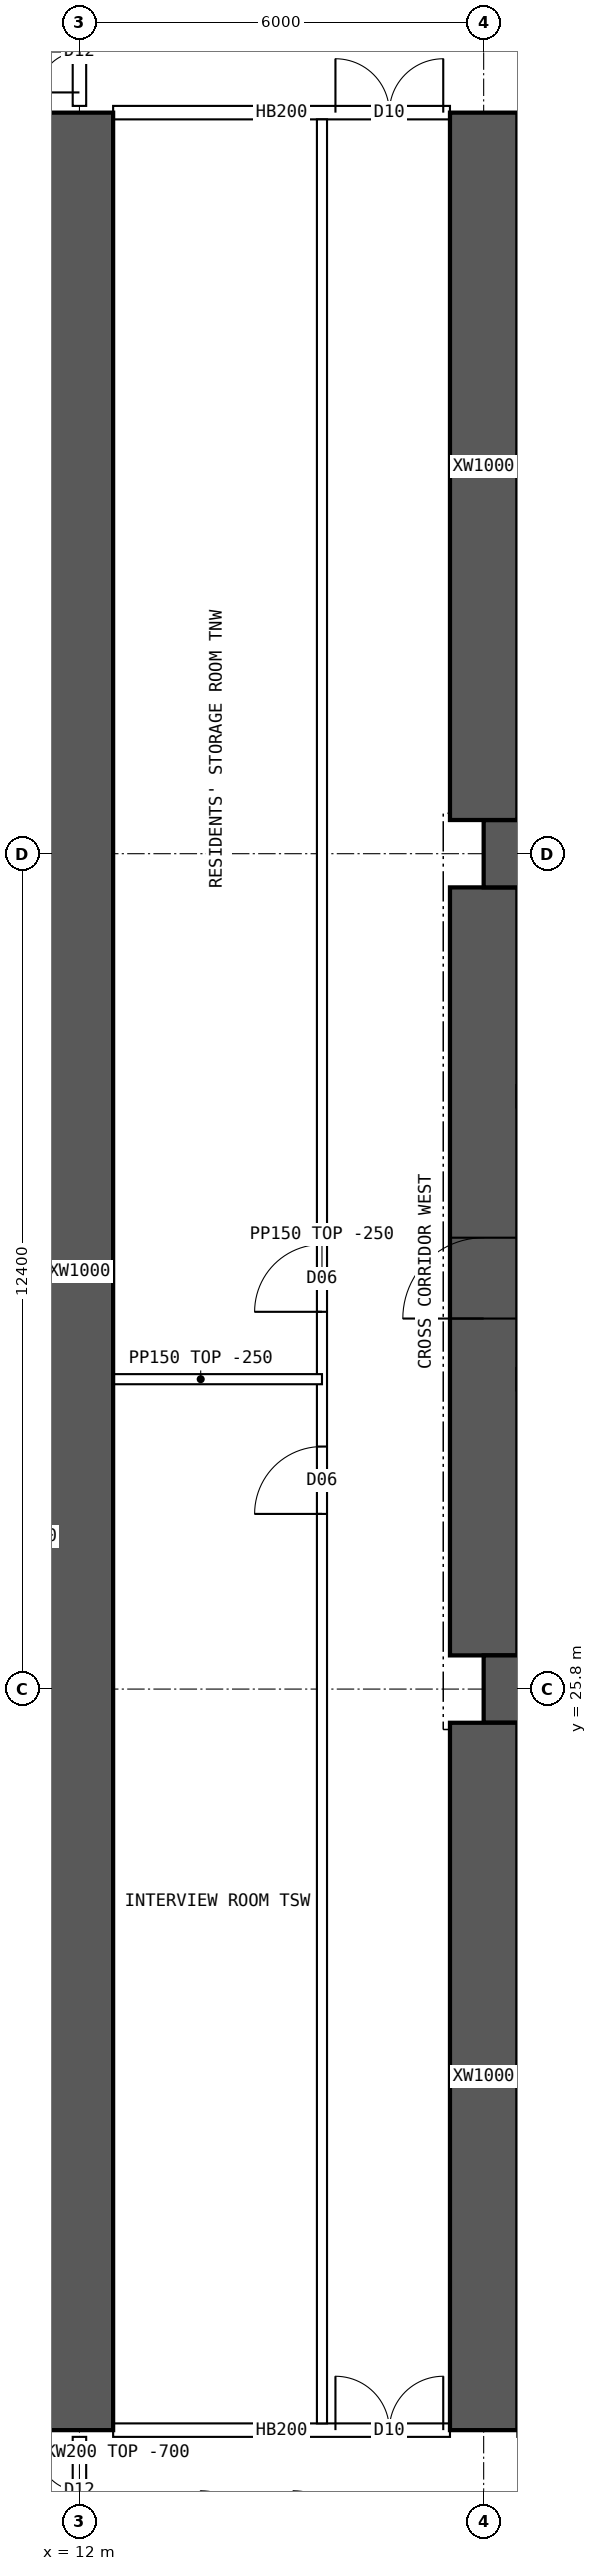
"""IFC4 building model, lengths in metres.
Left out: names, types, materials, properties, quantities, classifications, styles, units other than length and angle.
Written with IfcOpenShell. Run it as: python <this file> out.ifc"""

import sys

from ifc_helpers import new_model, si_unit, direction, frame, frame_2d, origin, place, context, subcontext, project, spatial, polyline, rectangle, outline, extrude, element, fill, save


model = new_model("IFC4")
c1 = context("Model", 3, precision=1e-05, world=origin(), true_north=direction((0.0, 1.0)))
c2 = subcontext(c1, "Body", "Model", "MODEL_VIEW")
j1 = project(units=[si_unit("LENGTHUNIT", "METRE"), si_unit("PLANEANGLEUNIT", "RADIAN")], contexts=[c1])
p1 = place(None, origin())
s1 = spatial("IfcSite", under=j1, at=p1, CompositionType="ELEMENT")
p2 = place(p1, origin())
s2 = spatial("IfcBuilding", under=s1, at=p2, CompositionType="ELEMENT")
p3 = place(p2, frame((0.0, 0.0, 61.45)))
s3 = spatial("IfcBuildingStorey", under=s2, at=p3, CompositionType="ELEMENT", Elevation=61.45)
for number, where, z_axis, x_axis in (
    (1, (18.0, 25.8, 0.0), (0.0, 0.0, 1.0), (1.0, 0.0, 0.0)),
    (2, (18.0, 38.2, 0.0), (0.0, 0.0, 1.0), (1.0, 0.0, 0.0)),
):
    element("IfcWall", number, at=place(p3, frame(where, z_axis=z_axis, x_axis=x_axis)), inside=s3, PredefinedType="SHEAR", context=c2, shape_type="SweptSolid", body=[
        extrude(rectangle(XDim=48.0, YDim=1.0, at=frame_2d((24.0, 0.0))), origin(), (0.0, 0.0, 1.0), 3.75),
    ])
p4 = place(p3, frame((18.0, 26.3, 0.0), z_axis=(0.0, 0.0, 1.0), x_axis=(0.0, 1.0, 0.0)))
e3 = element("IfcWall", 3, at=p4, inside=s3, PredefinedType="SHEAR", context=c2, shape_type="SweptSolid", body=[
    extrude(rectangle(XDim=11.4, YDim=1.0, at=frame_2d((5.7, 0.0))), origin(), (0.0, 0.0, 1.0), 3.75),
])
p5 = place(p4, frame((5.0, 0.0, 0.0)))
e4 = element("IfcOpeningElement", 4, at=p5, cuts=e3, PredefinedType="OPENING", context=c2, shape_type="SweptSolid", body=[
    extrude(rectangle(XDim=1.2, YDim=2.1, at=frame_2d((0.6, 1.05))), frame((0.0, 0.51, 0.0), z_axis=(0.0, -1.0, 0.0), x_axis=(1.0, 0.0, 0.0)), (0.0, 0.0, 1.0), 1.02),
])
p6 = place(p3, frame((12.0, 14.8, 0.0), z_axis=(0.0, 0.0, 1.0), x_axis=(0.0, 1.0, 0.0)))
e5 = element("IfcWall", 5, at=p6, inside=s3, PredefinedType="SHEAR", context=c2, shape_type="SweptSolid", body=[
    extrude(rectangle(XDim=34.4, YDim=1.0, at=frame_2d((17.2, 0.0))), origin(), (0.0, 0.0, 1.0), 3.75),
])
for number, where, z_axis, x_axis in (
    (6, (18.0, 14.8, 0.0), (0.0, 0.0, 1.0), (0.0, 1.0, 0.0)),
    (7, (18.0, 38.7, 0.0), (0.0, 0.0, 1.0), (0.0, 1.0, 0.0)),
):
    element("IfcWall", number, at=place(p3, frame(where, z_axis=z_axis, x_axis=x_axis)), inside=s3, PredefinedType="SHEAR", context=c2, shape_type="SweptSolid", body=[
        extrude(rectangle(XDim=10.5, YDim=1.0, at=frame_2d((5.25, 0.0))), origin(), (0.0, 0.0, 1.0), 3.75),
    ])
p7 = place(p3, frame((12.5, 14.8, 0.0), z_axis=(0.0, 0.0, 1.0), x_axis=(1.0, 0.0, 0.0)))
e8 = element("IfcWall", 8, at=p7, inside=s3, PredefinedType="SOLIDWALL", context=c2, shape_type="SweptSolid", body=[
    extrude(rectangle(XDim=5.0, YDim=0.2, at=frame_2d((2.5, 0.0))), origin(), (0.0, 0.0, 1.0), 3.5),
])
p8 = place(p7, frame((3.3, 0.0, 0.0)))
e9 = element("IfcOpeningElement", 9, at=p8, cuts=e8, PredefinedType="OPENING", context=c2, shape_type="SweptSolid", body=[
    extrude(rectangle(XDim=1.6, YDim=2.1, at=frame_2d((0.8, 1.05))), frame((0.0, 0.11, 0.0), z_axis=(0.0, -1.0, 0.0), x_axis=(1.0, 0.0, 0.0)), (0.0, 0.0, 1.0), 0.22),
])
p9 = place(p3, frame((12.5, 49.2, 0.0), z_axis=(0.0, 0.0, 1.0), x_axis=(1.0, 0.0, 0.0)))
e10 = element("IfcWall", 10, at=p9, inside=s3, PredefinedType="SOLIDWALL", context=c2, shape_type="SweptSolid", body=[
    extrude(rectangle(XDim=5.0, YDim=0.2, at=frame_2d((2.5, 0.0))), origin(), (0.0, 0.0, 1.0), 3.5),
])
p10 = place(p9, frame((3.3, 0.0, 0.0)))
e11 = element("IfcOpeningElement", 11, at=p10, cuts=e10, PredefinedType="OPENING", context=c2, shape_type="SweptSolid", body=[
    extrude(rectangle(XDim=1.6, YDim=2.1, at=frame_2d((0.8, 1.05))), frame((0.0, 0.11, 0.0), z_axis=(0.0, -1.0, 0.0), x_axis=(1.0, 0.0, 0.0)), (0.0, 0.0, 1.0), 0.22),
])
p11 = place(p3, frame((15.6, 14.9, 0.0), z_axis=(0.0, 0.0, 1.0), x_axis=(0.0, 1.0, 0.0)))
e12 = element("IfcWall", 12, at=p11, inside=s3, PredefinedType="PARTITIONING", context=c2, shape_type="SweptSolid", body=[
    extrude(rectangle(XDim=34.2, YDim=0.15, at=frame_2d((17.1, 0.0))), origin(), (0.0, 0.0, 1.0), 3.5),
])
p12 = place(p11, frame((13.5, 0.0, 0.0)))
e13 = element("IfcOpeningElement", 13, at=p12, cuts=e12, PredefinedType="OPENING", context=c2, shape_type="SweptSolid", body=[
    extrude(rectangle(XDim=1.0, YDim=2.1, at=frame_2d((0.5, 1.05))), frame((0.0, 0.085, 0.0), z_axis=(0.0, -1.0, 0.0), x_axis=(1.0, 0.0, 0.0)), (0.0, 0.0, 1.0), 0.17),
])
p13 = place(p11, frame((16.5, 0.0, 0.0)))
e14 = element("IfcOpeningElement", 14, at=p13, cuts=e12, PredefinedType="OPENING", context=c2, shape_type="SweptSolid", body=[
    extrude(rectangle(XDim=1.0, YDim=2.1, at=frame_2d((0.5, 1.05))), frame((0.0, 0.085, 0.0), z_axis=(0.0, -1.0, 0.0), x_axis=(1.0, 0.0, 0.0)), (0.0, 0.0, 1.0), 0.17),
])
p14 = place(p3, frame((12.0, 30.4, 0.0), z_axis=(0.0, 0.0, 1.0), x_axis=(1.0, 0.0, 0.0)))
e15 = element("IfcWall", 15, at=p14, inside=s3, PredefinedType="PARTITIONING", context=c2, shape_type="SweptSolid", body=[
    extrude(rectangle(XDim=3.6, YDim=0.15, at=frame_2d((1.8, 0.0))), origin(), (0.0, 0.0, 1.0), 3.5),
])
p15 = place(p3, frame((3.905, 30.85, 0.0), z_axis=(0.0, 0.0, 1.0), x_axis=(1.0, 0.0, 0.0)))
e16 = element("IfcWall", 16, at=p15, inside=s3, PredefinedType="PARTITIONING", context=c2, shape_type="SweptSolid", body=[
    extrude(outline(polyline([(0.0, 0.0), (8.02, 0.0), (8.02, 3.5), (2.397, 3.5), (2.395, 3.05), (1.797, 3.05), (1.795, 3.5), (0.0, 3.5), (0.0, 0.0)])), frame((0.0, 0.075, 0.0), z_axis=(0.0, -1.0, 0.0), x_axis=(1.0, 0.0, 0.0)), (0.0, 0.0, 1.0), 0.15),
])
p16 = place(p3, frame((12.0, 13.1, 0.0), z_axis=(0.0, 0.0, 1.0), x_axis=(0.0, 1.0, 0.0)))
e17 = element("IfcWall", 17, at=p16, inside=s3, PredefinedType="SOLIDWALL", context=c2, shape_type="SweptSolid", body=[
    extrude(outline(polyline([(0.0, 0.0), (1.6, 0.0), (1.6, 3.05), (0.0, 3.05), (0.0, 0.0)])), frame((0.0, 0.1, 0.0), z_axis=(0.0, -1.0, 0.0), x_axis=(1.0, 0.0, 0.0)), (0.0, 0.0, 1.0), 0.2),
])
p17 = place(p16, frame((0.2, 0.0, 0.0)))
e18 = element("IfcOpeningElement", 18, at=p17, cuts=e17, PredefinedType="OPENING", context=c2, shape_type="SweptSolid", body=[
    extrude(rectangle(XDim=1.2, YDim=2.1, at=frame_2d((0.6, 1.05))), frame((0.0, 0.11, 0.0), z_axis=(0.0, -1.0, 0.0), x_axis=(1.0, 0.0, 0.0)), (0.0, 0.0, 1.0), 0.22),
])
p18 = place(p3, frame((12.0, 49.3, 0.0), z_axis=(0.0, 0.0, 1.0), x_axis=(0.0, 1.0, 0.0)))
e19 = element("IfcWall", 19, at=p18, inside=s3, PredefinedType="SOLIDWALL", context=c2, shape_type="SweptSolid", body=[
    extrude(outline(polyline([(0.0, 0.0), (1.6, 0.0), (1.6, 3.05), (0.0, 3.05), (0.0, 0.0)])), frame((0.0, 0.1, 0.0), z_axis=(0.0, -1.0, 0.0), x_axis=(1.0, 0.0, 0.0)), (0.0, 0.0, 1.0), 0.2),
])
p19 = place(p18, frame((0.2, 0.0, 0.0)))
e20 = element("IfcOpeningElement", 20, at=p19, cuts=e19, PredefinedType="OPENING", context=c2, shape_type="SweptSolid", body=[
    extrude(rectangle(XDim=1.2, YDim=2.1, at=frame_2d((0.6, 1.05))), frame((0.0, 0.11, 0.0), z_axis=(0.0, -1.0, 0.0), x_axis=(1.0, 0.0, 0.0)), (0.0, 0.0, 1.0), 0.22),
])
p20 = place(p5, origin())
e21 = element("IfcDoor", 21, at=p20, inside=s3, OperationType="SINGLE_SWING_LEFT", PredefinedType="DOOR", context=c2, shape_type="SweptSolid", body=[
    extrude(rectangle(XDim=1.2, YDim=2.1, at=frame_2d((0.6, 1.05))), frame((0.0, 0.025, 0.0), z_axis=(0.0, -1.0, 0.0), x_axis=(1.0, 0.0, 0.0)), (0.0, 0.0, 1.0), 0.05),
])
fill(e4, e21)
p21 = place(p8, origin())
e22 = element("IfcDoor", 22, at=p21, inside=s3, OperationType="DOUBLE_DOOR_SINGLE_SWING", PredefinedType="DOOR", context=c2, shape_type="SweptSolid", body=[
    extrude(rectangle(XDim=1.6, YDim=2.1, at=frame_2d((0.8, 1.05))), frame((0.0, 0.025, 0.0), z_axis=(0.0, -1.0, 0.0), x_axis=(1.0, 0.0, 0.0)), (0.0, 0.0, 1.0), 0.05),
])
fill(e9, e22)
p22 = place(p10, origin())
e23 = element("IfcDoor", 23, at=p22, inside=s3, OperationType="DOUBLE_DOOR_SINGLE_SWING", PredefinedType="DOOR", context=c2, shape_type="SweptSolid", body=[
    extrude(rectangle(XDim=1.6, YDim=2.1, at=frame_2d((0.8, 1.05))), frame((0.0, 0.025, 0.0), z_axis=(0.0, -1.0, 0.0), x_axis=(1.0, 0.0, 0.0)), (0.0, 0.0, 1.0), 0.05),
])
fill(e11, e23)
p23 = place(p12, origin())
e24 = element("IfcDoor", 24, at=p23, inside=s3, OperationType="SINGLE_SWING_LEFT", PredefinedType="DOOR", context=c2, shape_type="SweptSolid", body=[
    extrude(rectangle(XDim=1.0, YDim=2.1, at=frame_2d((0.5, 1.05))), frame((0.0, 0.025, 0.0), z_axis=(0.0, -1.0, 0.0), x_axis=(1.0, 0.0, 0.0)), (0.0, 0.0, 1.0), 0.05),
])
fill(e13, e24)
p24 = place(p13, origin())
e25 = element("IfcDoor", 25, at=p24, inside=s3, OperationType="SINGLE_SWING_LEFT", PredefinedType="DOOR", context=c2, shape_type="SweptSolid", body=[
    extrude(rectangle(XDim=1.0, YDim=2.1, at=frame_2d((0.5, 1.05))), frame((0.0, 0.025, 0.0), z_axis=(0.0, -1.0, 0.0), x_axis=(1.0, 0.0, 0.0)), (0.0, 0.0, 1.0), 0.05),
])
fill(e14, e25)
p25 = place(p17, origin())
e26 = element("IfcDoor", 26, at=p25, inside=s3, OperationType="DOUBLE_DOOR_SINGLE_SWING", PredefinedType="DOOR", context=c2, shape_type="SweptSolid", body=[
    extrude(rectangle(XDim=1.2, YDim=2.1, at=frame_2d((0.6, 1.05))), frame((0.0, 0.025, 0.0), z_axis=(0.0, -1.0, 0.0), x_axis=(1.0, 0.0, 0.0)), (0.0, 0.0, 1.0), 0.05),
])
fill(e18, e26)
p26 = place(p19, origin())
e27 = element("IfcDoor", 27, at=p26, inside=s3, OperationType="DOUBLE_DOOR_SINGLE_SWING", PredefinedType="DOOR", context=c2, shape_type="SweptSolid", body=[
    extrude(rectangle(XDim=1.2, YDim=2.1, at=frame_2d((0.6, 1.05))), frame((0.0, 0.025, 0.0), z_axis=(0.0, -1.0, 0.0), x_axis=(1.0, 0.0, 0.0)), (0.0, 0.0, 1.0), 0.05),
])
fill(e20, e27)
save(model, sys.argv[1])
